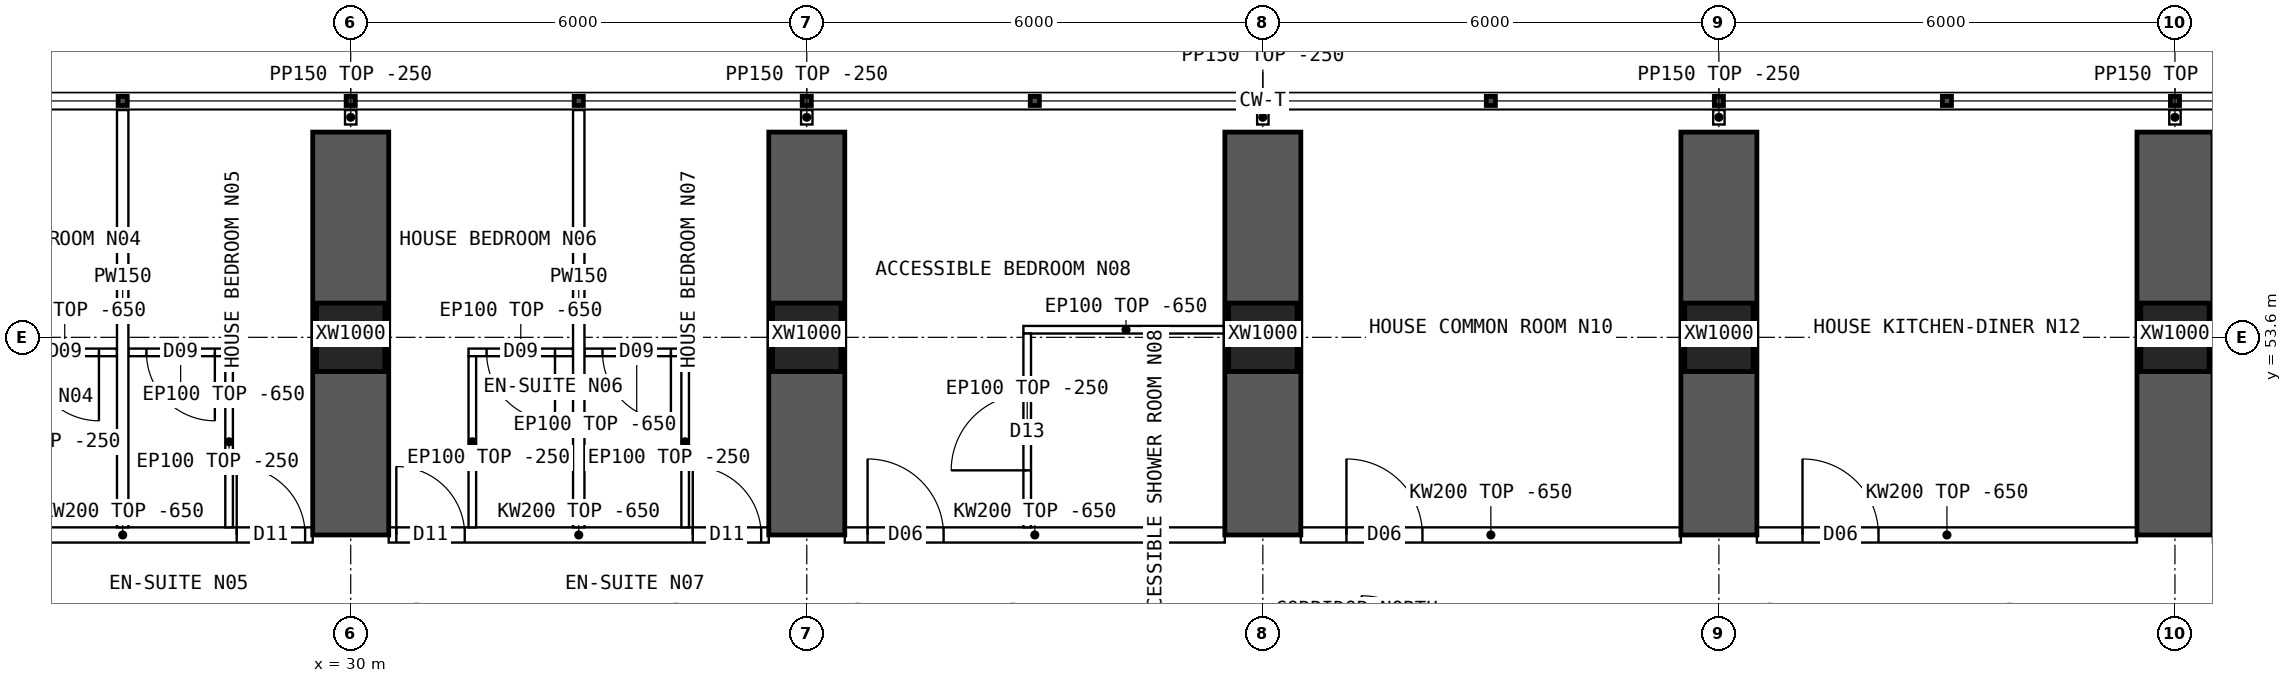
"""IFC4 building model, lengths in metres.
Left out: names, types, materials, properties, quantities, classifications, styles, units other than length and angle.
Written with IfcOpenShell. Run it as: python <this file> out.ifc"""

import sys

from ifc_helpers import new_model, si_unit, direction, frame, frame_2d, origin, origin_2d, place, context, subcontext, project, spatial, polyline, rectangle, hollow_rectangle, outline, extrude, element, fill, save


model = new_model("IFC4")
c1 = context("Model", 3, precision=1e-05, world=origin(), true_north=direction((0.0, 1.0)))
c2 = subcontext(c1, "Body", "Model", "MODEL_VIEW")
j1 = project(units=[si_unit("LENGTHUNIT", "METRE"), si_unit("PLANEANGLEUNIT", "RADIAN")], contexts=[c1])
p1 = place(None, origin())
s1 = spatial("IfcSite", under=j1, at=p1, CompositionType="ELEMENT")
p2 = place(p1, origin())
s2 = spatial("IfcBuilding", under=s1, at=p2, CompositionType="ELEMENT")
p3 = place(p2, frame((0.0, 0.0, 31.45)))
s3 = spatial("IfcBuildingStorey", under=s2, at=p3, CompositionType="ELEMENT", Elevation=31.45)
for number, where, z_axis, x_axis in (
    (1, (30.0, 53.6, 0.0), (0.0, 0.0, 1.0), (1.0, 0.0, 0.0)),
    (2, (36.0, 53.6, 0.0), (0.0, 0.0, 1.0), (1.0, 0.0, 0.0)),
    (3, (42.0, 53.6, 0.0), (0.0, 0.0, 1.0), (1.0, 0.0, 0.0)),
    (4, (48.0, 53.6, 0.0), (0.0, 0.0, 1.0), (1.0, 0.0, 0.0)),
    (5, (54.0, 53.6, 0.0), (0.0, 0.0, 1.0), (1.0, 0.0, 0.0)),
):
    element("IfcColumn", number, at=place(p3, frame(where, z_axis=z_axis, x_axis=x_axis)), inside=s3, PredefinedType="COLUMN", context=c2, shape_type="SweptSolid", body=[
        extrude(hollow_rectangle(XDim=0.9, YDim=0.9, WallThickness=0.09, at=origin_2d()), origin(), (0.0, 0.0, 1.0), 3.75),
    ])
for number, where, z_axis, x_axis in (
    (6, (30.0, 51.0, 0.0), (0.0, 0.0, 1.0), (0.0, 1.0, 0.0)),
    (7, (36.0, 51.0, 0.0), (0.0, 0.0, 1.0), (0.0, 1.0, 0.0)),
    (8, (42.0, 51.0, 0.0), (0.0, 0.0, 1.0), (0.0, 1.0, 0.0)),
    (9, (48.0, 51.0, 0.0), (0.0, 0.0, 1.0), (0.0, 1.0, 0.0)),
    (10, (54.0, 51.0, 0.0), (0.0, 0.0, 1.0), (0.0, 1.0, 0.0)),
):
    element("IfcWall", number, at=place(p3, frame(where, z_axis=z_axis, x_axis=x_axis)), inside=s3, PredefinedType="SHEAR", context=c2, shape_type="SweptSolid", body=[
        extrude(rectangle(XDim=5.3, YDim=1.0, at=frame_2d((2.65, 0.0))), origin(), (0.0, 0.0, 1.0), 3.75),
    ])
p4 = place(p3, frame((24.5, 51.0, 0.0), z_axis=(0.0, 0.0, 1.0), x_axis=(1.0, 0.0, 0.0)))
e11 = element("IfcWall", 11, at=p4, inside=s3, PredefinedType="SOLIDWALL", context=c2, shape_type="SweptSolid", body=[
    extrude(outline(polyline([(0.0, 0.0), (5.0, 0.0), (5.0, 3.1), (0.0, 3.1), (0.0, 0.0)])), frame((0.0, 0.1, 0.0), z_axis=(0.0, -1.0, 0.0), x_axis=(1.0, 0.0, 0.0)), (0.0, 0.0, 1.0), 0.2),
])
p5 = place(p4, frame((0.1, 0.0, 0.0)))
e12 = element("IfcOpeningElement", 12, at=p5, cuts=e11, PredefinedType="OPENING", context=c2, shape_type="SweptSolid", body=[
    extrude(rectangle(XDim=0.9, YDim=2.1, at=frame_2d((0.45, 1.05))), frame((0.0, 0.11, 0.0), z_axis=(0.0, -1.0, 0.0), x_axis=(1.0, 0.0, 0.0)), (0.0, 0.0, 1.0), 0.22),
])
p6 = place(p4, frame((4.0, 0.0, 0.0)))
e13 = element("IfcOpeningElement", 13, at=p6, cuts=e11, PredefinedType="OPENING", context=c2, shape_type="SweptSolid", body=[
    extrude(rectangle(XDim=0.9, YDim=2.1, at=frame_2d((0.45, 1.05))), frame((0.0, 0.11, 0.0), z_axis=(0.0, -1.0, 0.0), x_axis=(1.0, 0.0, 0.0)), (0.0, 0.0, 1.0), 0.22),
])
p7 = place(p3, frame((30.5, 51.0, 0.0), z_axis=(0.0, 0.0, 1.0), x_axis=(1.0, 0.0, 0.0)))
e14 = element("IfcWall", 14, at=p7, inside=s3, PredefinedType="SOLIDWALL", context=c2, shape_type="SweptSolid", body=[
    extrude(outline(polyline([(0.0, 0.0), (5.0, 0.0), (5.0, 3.1), (0.0, 3.1), (0.0, 0.0)])), frame((0.0, 0.1, 0.0), z_axis=(0.0, -1.0, 0.0), x_axis=(1.0, 0.0, 0.0)), (0.0, 0.0, 1.0), 0.2),
])
p8 = place(p7, frame((0.1, 0.0, 0.0)))
e15 = element("IfcOpeningElement", 15, at=p8, cuts=e14, PredefinedType="OPENING", context=c2, shape_type="SweptSolid", body=[
    extrude(rectangle(XDim=0.9, YDim=2.1, at=frame_2d((0.45, 1.05))), frame((0.0, 0.11, 0.0), z_axis=(0.0, -1.0, 0.0), x_axis=(1.0, 0.0, 0.0)), (0.0, 0.0, 1.0), 0.22),
])
p9 = place(p7, frame((4.0, 0.0, 0.0)))
e16 = element("IfcOpeningElement", 16, at=p9, cuts=e14, PredefinedType="OPENING", context=c2, shape_type="SweptSolid", body=[
    extrude(rectangle(XDim=0.9, YDim=2.1, at=frame_2d((0.45, 1.05))), frame((0.0, 0.11, 0.0), z_axis=(0.0, -1.0, 0.0), x_axis=(1.0, 0.0, 0.0)), (0.0, 0.0, 1.0), 0.22),
])
p10 = place(p3, frame((36.5, 51.0, 0.0), z_axis=(0.0, 0.0, 1.0), x_axis=(1.0, 0.0, 0.0)))
e17 = element("IfcWall", 17, at=p10, inside=s3, PredefinedType="SOLIDWALL", context=c2, shape_type="SweptSolid", body=[
    extrude(outline(polyline([(0.0, 0.0), (5.0, 0.0), (5.0, 3.1), (0.0, 3.1), (0.0, 0.0)])), frame((0.0, 0.1, 0.0), z_axis=(0.0, -1.0, 0.0), x_axis=(1.0, 0.0, 0.0)), (0.0, 0.0, 1.0), 0.2),
])
p11 = place(p10, frame((0.3, 0.0, 0.0)))
e18 = element("IfcOpeningElement", 18, at=p11, cuts=e17, PredefinedType="OPENING", context=c2, shape_type="SweptSolid", body=[
    extrude(rectangle(XDim=1.0, YDim=2.1, at=frame_2d((0.5, 1.05))), frame((0.0, 0.11, 0.0), z_axis=(0.0, -1.0, 0.0), x_axis=(1.0, 0.0, 0.0)), (0.0, 0.0, 1.0), 0.22),
])
p12 = place(p3, frame((42.5, 51.0, 0.0), z_axis=(0.0, 0.0, 1.0), x_axis=(1.0, 0.0, 0.0)))
e19 = element("IfcWall", 19, at=p12, inside=s3, PredefinedType="SOLIDWALL", context=c2, shape_type="SweptSolid", body=[
    extrude(outline(polyline([(0.0, 0.0), (5.0, 0.0), (5.0, 3.1), (0.0, 3.1), (0.0, 0.0)])), frame((0.0, 0.1, 0.0), z_axis=(0.0, -1.0, 0.0), x_axis=(1.0, 0.0, 0.0)), (0.0, 0.0, 1.0), 0.2),
])
p13 = place(p12, frame((0.6, 0.0, 0.0)))
e20 = element("IfcOpeningElement", 20, at=p13, cuts=e19, PredefinedType="OPENING", context=c2, shape_type="SweptSolid", body=[
    extrude(rectangle(XDim=1.0, YDim=2.1, at=frame_2d((0.5, 1.05))), frame((0.0, 0.11, 0.0), z_axis=(0.0, -1.0, 0.0), x_axis=(1.0, 0.0, 0.0)), (0.0, 0.0, 1.0), 0.22),
])
p14 = place(p3, frame((48.5, 51.0, 0.0), z_axis=(0.0, 0.0, 1.0), x_axis=(1.0, 0.0, 0.0)))
e21 = element("IfcWall", 21, at=p14, inside=s3, PredefinedType="SOLIDWALL", context=c2, shape_type="SweptSolid", body=[
    extrude(outline(polyline([(0.0, 0.0), (5.0, 0.0), (5.0, 3.1), (0.0, 3.1), (0.0, 0.0)])), frame((0.0, 0.1, 0.0), z_axis=(0.0, -1.0, 0.0), x_axis=(1.0, 0.0, 0.0)), (0.0, 0.0, 1.0), 0.2),
])
p15 = place(p14, frame((0.6, 0.0, 0.0)))
e22 = element("IfcOpeningElement", 22, at=p15, cuts=e21, PredefinedType="OPENING", context=c2, shape_type="SweptSolid", body=[
    extrude(rectangle(XDim=1.0, YDim=2.1, at=frame_2d((0.5, 1.05))), frame((0.0, 0.11, 0.0), z_axis=(0.0, -1.0, 0.0), x_axis=(1.0, 0.0, 0.0)), (0.0, 0.0, 1.0), 0.22),
])
p16 = place(p3, frame((27.0, 56.59, 0.0), z_axis=(0.0, 0.0, 1.0), x_axis=(0.0, -1.0, 0.0)))
e23 = element("IfcWall", 23, at=p16, inside=s3, PredefinedType="PARTITIONING", context=c2, shape_type="SweptSolid", body=[
    extrude(outline(polyline([(0.0, 0.0), (5.49, 0.0), (5.49, 3.1), (5.442, 3.1), (5.44, 3.5), (3.192, 3.5), (3.19, 3.1), (2.792, 3.1), (2.79, 3.5), (0.0, 3.5), (0.0, 0.0)])), frame((0.0, 0.075, 0.0), z_axis=(0.0, -1.0, 0.0), x_axis=(1.0, 0.0, 0.0)), (0.0, 0.0, 1.0), 0.15),
])
p17 = place(p3, frame((25.55, 53.402, 0.0), z_axis=(0.0, 0.0, 1.0), x_axis=(1.0, 0.0, 0.0)))
e24 = element("IfcWall", 24, at=p17, inside=s3, PredefinedType="PARTITIONING", context=c2, shape_type="SweptSolid", body=[
    extrude(outline(polyline([(0.0, 0.0), (1.375, 0.0), (1.375, 3.1), (0.0, 3.1), (0.0, 0.0)])), frame((0.0, 0.05, 0.0), z_axis=(0.0, -1.0, 0.0), x_axis=(1.0, 0.0, 0.0)), (0.0, 0.0, 1.0), 0.1),
])
p18 = place(p17, frame((0.238, 0.0, 0.0)))
e25 = element("IfcOpeningElement", 25, at=p18, cuts=e24, PredefinedType="OPENING", context=c2, shape_type="SweptSolid", body=[
    extrude(rectangle(XDim=0.9, YDim=2.1, at=frame_2d((0.45, 1.05))), frame((0.0, 0.06, 0.0), z_axis=(0.0, -1.0, 0.0), x_axis=(1.0, 0.0, 0.0)), (0.0, 0.0, 1.0), 0.12),
])
p19 = place(p3, frame((27.075, 53.402, 0.0), z_axis=(0.0, 0.0, 1.0), x_axis=(1.0, 0.0, 0.0)))
e26 = element("IfcWall", 26, at=p19, inside=s3, PredefinedType="PARTITIONING", context=c2, shape_type="SweptSolid", body=[
    extrude(outline(polyline([(0.0, 0.0), (1.375, 0.0), (1.375, 3.1), (0.0, 3.1), (0.0, 0.0)])), frame((0.0, 0.05, 0.0), z_axis=(0.0, -1.0, 0.0), x_axis=(1.0, 0.0, 0.0)), (0.0, 0.0, 1.0), 0.1),
])
p20 = place(p19, frame((0.238, 0.0, 0.0)))
e27 = element("IfcOpeningElement", 27, at=p20, cuts=e26, PredefinedType="OPENING", context=c2, shape_type="SweptSolid", body=[
    extrude(rectangle(XDim=0.9, YDim=2.1, at=frame_2d((0.45, 1.05))), frame((0.0, 0.06, 0.0), z_axis=(0.0, -1.0, 0.0), x_axis=(1.0, 0.0, 0.0)), (0.0, 0.0, 1.0), 0.12),
])
p21 = place(p3, frame((28.4, 53.352, 0.0), z_axis=(0.0, 0.0, 1.0), x_axis=(0.0, -1.0, 0.0)))
e28 = element("IfcWall", 28, at=p21, inside=s3, PredefinedType="PARTITIONING", context=c2, shape_type="SweptSolid", body=[
    extrude(outline(polyline([(0.0, 0.0), (2.252, 0.0), (2.252, 3.1), (2.204, 3.1), (2.202, 3.5), (0.0, 3.5), (0.0, 0.0)])), frame((0.0, 0.05, 0.0), z_axis=(0.0, -1.0, 0.0), x_axis=(1.0, 0.0, 0.0)), (0.0, 0.0, 1.0), 0.1),
])
p22 = place(p3, frame((33.0, 56.59, 0.0), z_axis=(0.0, 0.0, 1.0), x_axis=(0.0, -1.0, 0.0)))
e29 = element("IfcWall", 29, at=p22, inside=s3, PredefinedType="PARTITIONING", context=c2, shape_type="SweptSolid", body=[
    extrude(outline(polyline([(0.0, 0.0), (5.49, 0.0), (5.49, 3.1), (5.442, 3.1), (5.44, 3.5), (3.192, 3.5), (3.19, 3.1), (2.792, 3.1), (2.79, 3.5), (0.0, 3.5), (0.0, 0.0)])), frame((0.0, 0.075, 0.0), z_axis=(0.0, -1.0, 0.0), x_axis=(1.0, 0.0, 0.0)), (0.0, 0.0, 1.0), 0.15),
])
p23 = place(p3, frame((31.55, 53.402, 0.0), z_axis=(0.0, 0.0, 1.0), x_axis=(1.0, 0.0, 0.0)))
e30 = element("IfcWall", 30, at=p23, inside=s3, PredefinedType="PARTITIONING", context=c2, shape_type="SweptSolid", body=[
    extrude(outline(polyline([(0.0, 0.0), (1.375, 0.0), (1.375, 3.1), (0.0, 3.1), (0.0, 0.0)])), frame((0.0, 0.05, 0.0), z_axis=(0.0, -1.0, 0.0), x_axis=(1.0, 0.0, 0.0)), (0.0, 0.0, 1.0), 0.1),
])
p24 = place(p23, frame((0.238, 0.0, 0.0)))
e31 = element("IfcOpeningElement", 31, at=p24, cuts=e30, PredefinedType="OPENING", context=c2, shape_type="SweptSolid", body=[
    extrude(rectangle(XDim=0.9, YDim=2.1, at=frame_2d((0.45, 1.05))), frame((0.0, 0.06, 0.0), z_axis=(0.0, -1.0, 0.0), x_axis=(1.0, 0.0, 0.0)), (0.0, 0.0, 1.0), 0.12),
])
p25 = place(p3, frame((31.6, 53.352, 0.0), z_axis=(0.0, 0.0, 1.0), x_axis=(0.0, -1.0, 0.0)))
e32 = element("IfcWall", 32, at=p25, inside=s3, PredefinedType="PARTITIONING", context=c2, shape_type="SweptSolid", body=[
    extrude(outline(polyline([(0.0, 0.0), (2.252, 0.0), (2.252, 3.1), (2.204, 3.1), (2.202, 3.5), (0.0, 3.5), (0.0, 0.0)])), frame((0.0, 0.05, 0.0), z_axis=(0.0, -1.0, 0.0), x_axis=(1.0, 0.0, 0.0)), (0.0, 0.0, 1.0), 0.1),
])
p26 = place(p3, frame((33.075, 53.402, 0.0), z_axis=(0.0, 0.0, 1.0), x_axis=(1.0, 0.0, 0.0)))
e33 = element("IfcWall", 33, at=p26, inside=s3, PredefinedType="PARTITIONING", context=c2, shape_type="SweptSolid", body=[
    extrude(outline(polyline([(0.0, 0.0), (1.375, 0.0), (1.375, 3.1), (0.0, 3.1), (0.0, 0.0)])), frame((0.0, 0.05, 0.0), z_axis=(0.0, -1.0, 0.0), x_axis=(1.0, 0.0, 0.0)), (0.0, 0.0, 1.0), 0.1),
])
p27 = place(p26, frame((0.238, 0.0, 0.0)))
e34 = element("IfcOpeningElement", 34, at=p27, cuts=e33, PredefinedType="OPENING", context=c2, shape_type="SweptSolid", body=[
    extrude(rectangle(XDim=0.9, YDim=2.1, at=frame_2d((0.45, 1.05))), frame((0.0, 0.06, 0.0), z_axis=(0.0, -1.0, 0.0), x_axis=(1.0, 0.0, 0.0)), (0.0, 0.0, 1.0), 0.12),
])
p28 = place(p3, frame((34.4, 53.352, 0.0), z_axis=(0.0, 0.0, 1.0), x_axis=(0.0, -1.0, 0.0)))
e35 = element("IfcWall", 35, at=p28, inside=s3, PredefinedType="PARTITIONING", context=c2, shape_type="SweptSolid", body=[
    extrude(outline(polyline([(0.0, 0.0), (2.252, 0.0), (2.252, 3.1), (2.204, 3.1), (2.202, 3.5), (0.0, 3.5), (0.0, 0.0)])), frame((0.0, 0.05, 0.0), z_axis=(0.0, -1.0, 0.0), x_axis=(1.0, 0.0, 0.0)), (0.0, 0.0, 1.0), 0.1),
])
p29 = place(p3, frame((38.85, 53.7, 0.0), z_axis=(0.0, 0.0, 1.0), x_axis=(1.0, 0.0, 0.0)))
e36 = element("IfcWall", 36, at=p29, inside=s3, PredefinedType="PARTITIONING", context=c2, shape_type="SweptSolid", body=[
    extrude(outline(polyline([(0.0, 0.0), (2.7, 0.0), (2.7, 3.1), (0.0, 3.1), (0.0, 0.0)])), frame((0.0, 0.05, 0.0), z_axis=(0.0, -1.0, 0.0), x_axis=(1.0, 0.0, 0.0)), (0.0, 0.0, 1.0), 0.1),
])
p30 = place(p3, frame((38.9, 53.65, 0.0), z_axis=(0.0, 0.0, 1.0), x_axis=(0.0, -1.0, 0.0)))
e37 = element("IfcWall", 37, at=p30, inside=s3, PredefinedType="PARTITIONING", context=c2, shape_type="SweptSolid", body=[
    extrude(outline(polyline([(0.0, 0.0), (2.55, 0.0), (2.55, 3.1), (2.502, 3.1), (2.5, 3.5), (0.252, 3.5), (0.25, 3.1), (0.0, 3.1), (0.0, 0.0)])), frame((0.0, 0.05, 0.0), z_axis=(0.0, -1.0, 0.0), x_axis=(1.0, 0.0, 0.0)), (0.0, 0.0, 1.0), 0.1),
])
p31 = place(p30, frame((0.8, 0.0, 0.0)))
e38 = element("IfcOpeningElement", 38, at=p31, cuts=e37, PredefinedType="OPENING", context=c2, shape_type="SweptSolid", body=[
    extrude(rectangle(XDim=1.0, YDim=2.1, at=frame_2d((0.5, 1.05))), frame((0.0, 0.06, 0.0), z_axis=(0.0, -1.0, 0.0), x_axis=(1.0, 0.0, 0.0)), (0.0, 0.0, 1.0), 0.12),
])
for number, where, z_axis, x_axis in (
    (39, (30.0, 56.4, 0.0), (0.0, 0.0, 1.0), (0.0, 1.0, 0.0)),
    (40, (36.0, 56.4, 0.0), (0.0, 0.0, 1.0), (0.0, 1.0, 0.0)),
    (41, (42.0, 56.4, 0.0), (0.0, 0.0, 1.0), (0.0, 1.0, 0.0)),
    (42, (48.0, 56.4, 0.0), (0.0, 0.0, 1.0), (0.0, 1.0, 0.0)),
    (43, (54.0, 56.4, 0.0), (0.0, 0.0, 1.0), (0.0, 1.0, 0.0)),
):
    element("IfcWall", number, at=place(p3, frame(where, z_axis=z_axis, x_axis=x_axis)), inside=s3, PredefinedType="PARTITIONING", context=c2, shape_type="SweptSolid", body=[
        extrude(rectangle(XDim=0.19, YDim=0.15, at=frame_2d((0.095, 0.0))), origin(), (0.0, 0.0, 1.0), 3.5),
    ])
p32 = place(p18, origin())
e44 = element("IfcDoor", 44, at=p32, inside=s3, OperationType="SINGLE_SWING_RIGHT", PredefinedType="DOOR", context=c2, shape_type="SweptSolid", body=[
    extrude(rectangle(XDim=0.9, YDim=2.1, at=frame_2d((0.45, 1.05))), frame((0.0, 0.025, 0.0), z_axis=(0.0, -1.0, 0.0), x_axis=(1.0, 0.0, 0.0)), (0.0, 0.0, 1.0), 0.05),
])
fill(e25, e44)
p33 = place(p20, origin())
e45 = element("IfcDoor", 45, at=p33, inside=s3, OperationType="SINGLE_SWING_RIGHT", PredefinedType="DOOR", context=c2, shape_type="SweptSolid", body=[
    extrude(rectangle(XDim=0.9, YDim=2.1, at=frame_2d((0.45, 1.05))), frame((0.0, 0.025, 0.0), z_axis=(0.0, -1.0, 0.0), x_axis=(1.0, 0.0, 0.0)), (0.0, 0.0, 1.0), 0.05),
])
fill(e27, e45)
p34 = place(p6, origin())
e46 = element("IfcDoor", 46, at=p34, inside=s3, OperationType="SINGLE_SWING_LEFT", PredefinedType="DOOR", context=c2, shape_type="SweptSolid", body=[
    extrude(rectangle(XDim=0.9, YDim=2.1, at=frame_2d((0.45, 1.05))), frame((0.0, 0.025, 0.0), z_axis=(0.0, -1.0, 0.0), x_axis=(1.0, 0.0, 0.0)), (0.0, 0.0, 1.0), 0.05),
])
fill(e13, e46)
p35 = place(p24, origin())
e47 = element("IfcDoor", 47, at=p35, inside=s3, OperationType="SINGLE_SWING_RIGHT", PredefinedType="DOOR", context=c2, shape_type="SweptSolid", body=[
    extrude(rectangle(XDim=0.9, YDim=2.1, at=frame_2d((0.45, 1.05))), frame((0.0, 0.025, 0.0), z_axis=(0.0, -1.0, 0.0), x_axis=(1.0, 0.0, 0.0)), (0.0, 0.0, 1.0), 0.05),
])
fill(e31, e47)
p36 = place(p8, origin())
e48 = element("IfcDoor", 48, at=p36, inside=s3, OperationType="SINGLE_SWING_LEFT", PredefinedType="DOOR", context=c2, shape_type="SweptSolid", body=[
    extrude(rectangle(XDim=0.9, YDim=2.1, at=frame_2d((0.45, 1.05))), frame((0.0, 0.025, 0.0), z_axis=(0.0, -1.0, 0.0), x_axis=(1.0, 0.0, 0.0)), (0.0, 0.0, 1.0), 0.05),
])
fill(e15, e48)
p37 = place(p27, origin())
e49 = element("IfcDoor", 49, at=p37, inside=s3, OperationType="SINGLE_SWING_RIGHT", PredefinedType="DOOR", context=c2, shape_type="SweptSolid", body=[
    extrude(rectangle(XDim=0.9, YDim=2.1, at=frame_2d((0.45, 1.05))), frame((0.0, 0.025, 0.0), z_axis=(0.0, -1.0, 0.0), x_axis=(1.0, 0.0, 0.0)), (0.0, 0.0, 1.0), 0.05),
])
fill(e34, e49)
p38 = place(p9, origin())
e50 = element("IfcDoor", 50, at=p38, inside=s3, OperationType="SINGLE_SWING_LEFT", PredefinedType="DOOR", context=c2, shape_type="SweptSolid", body=[
    extrude(rectangle(XDim=0.9, YDim=2.1, at=frame_2d((0.45, 1.05))), frame((0.0, 0.025, 0.0), z_axis=(0.0, -1.0, 0.0), x_axis=(1.0, 0.0, 0.0)), (0.0, 0.0, 1.0), 0.05),
])
fill(e16, e50)
p39 = place(p31, origin())
e51 = element("IfcDoor", 51, at=p39, inside=s3, OperationType="SINGLE_SWING_RIGHT", PredefinedType="DOOR", context=c2, shape_type="SweptSolid", body=[
    extrude(rectangle(XDim=1.0, YDim=2.1, at=frame_2d((0.5, 1.05))), frame((0.0, 0.025, 0.0), z_axis=(0.0, -1.0, 0.0), x_axis=(1.0, 0.0, 0.0)), (0.0, 0.0, 1.0), 0.05),
])
fill(e38, e51)
p40 = place(p11, origin())
e52 = element("IfcDoor", 52, at=p40, inside=s3, OperationType="SINGLE_SWING_LEFT", PredefinedType="DOOR", context=c2, shape_type="SweptSolid", body=[
    extrude(rectangle(XDim=1.0, YDim=2.1, at=frame_2d((0.5, 1.05))), frame((0.0, 0.025, 0.0), z_axis=(0.0, -1.0, 0.0), x_axis=(1.0, 0.0, 0.0)), (0.0, 0.0, 1.0), 0.05),
])
fill(e18, e52)
p41 = place(p13, origin())
e53 = element("IfcDoor", 53, at=p41, inside=s3, OperationType="SINGLE_SWING_LEFT", PredefinedType="DOOR", context=c2, shape_type="SweptSolid", body=[
    extrude(rectangle(XDim=1.0, YDim=2.1, at=frame_2d((0.5, 1.05))), frame((0.0, 0.025, 0.0), z_axis=(0.0, -1.0, 0.0), x_axis=(1.0, 0.0, 0.0)), (0.0, 0.0, 1.0), 0.05),
])
fill(e20, e53)
p42 = place(p15, origin())
e54 = element("IfcDoor", 54, at=p42, inside=s3, OperationType="SINGLE_SWING_LEFT", PredefinedType="DOOR", context=c2, shape_type="SweptSolid", body=[
    extrude(rectangle(XDim=1.0, YDim=2.1, at=frame_2d((0.5, 1.05))), frame((0.0, 0.025, 0.0), z_axis=(0.0, -1.0, 0.0), x_axis=(1.0, 0.0, 0.0)), (0.0, 0.0, 1.0), 0.05),
])
fill(e22, e54)
save(model, sys.argv[1])
